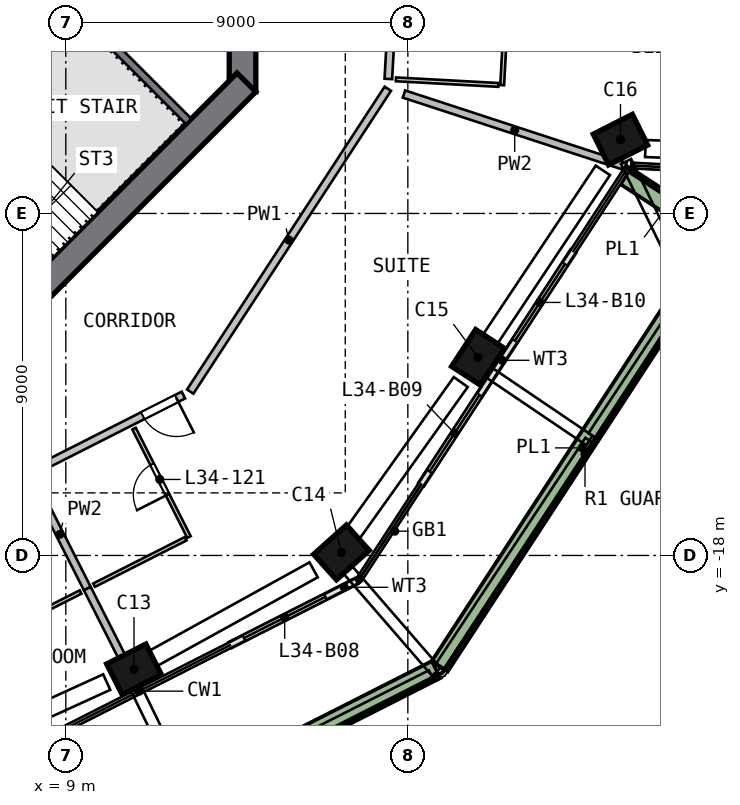
"""IFC4 building model, lengths in metres.
Left out: names, types, materials, properties, quantities, classifications, styles, units other than length and angle.
Written with IfcOpenShell. Run it as: python <this file> out.ifc"""

import sys

from ifc_helpers import new_model, si_unit, direction, frame, frame_2d, origin, origin_2d, place, context, subcontext, project, spatial, rectangle, extrude, element, fill, save


model = new_model("IFC4")
c1 = context("Model", 3, precision=1e-05, world=origin(), true_north=direction((0.0, 1.0)))
c2 = subcontext(c1, "Body", "Model", "MODEL_VIEW")
j1 = project(units=[si_unit("LENGTHUNIT", "METRE"), si_unit("PLANEANGLEUNIT", "RADIAN")], contexts=[c1])
p1 = place(None, origin())
s1 = spatial("IfcSite", under=j1, at=p1, CompositionType="ELEMENT")
p2 = place(p1, origin())
s2 = spatial("IfcBuilding", under=s1, at=p2, CompositionType="ELEMENT")
p3 = place(p2, frame((0.0, 0.0, 143.5)))
s3 = spatial("IfcBuildingStorey", under=s2, at=p3, CompositionType="ELEMENT", Elevation=143.5)
p4 = place(p3, frame((10.674, -21.058, 0.0), z_axis=(0.099777564, 0.051637931, 0.99366894), x_axis=(0.88633415, 0.449211123, -0.112343851)))
e1 = element("IfcColumn", 1, at=p4, inside=s3, PredefinedType="COLUMN", context=c2, shape_type="SweptSolid", body=[
    extrude(rectangle(XDim=1.15, YDim=0.9, at=origin_2d()), origin(), (0.0, 0.0, 1.0), 3.21),
])
p5 = place(p3, frame((16.15, -18.012, 0.0), z_axis=(0.084997843, 0.077471201, 0.993364777), x_axis=(-0.739822895, -0.662900147, 0.115002085)))
e2 = element("IfcColumn", 2, at=p5, inside=s3, PredefinedType="COLUMN", context=c2, shape_type="SweptSolid", body=[
    extrude(rectangle(XDim=1.15, YDim=0.9, at=origin_2d()), origin(), (0.0, 0.0, 1.0), 3.211),
])
p6 = place(p3, frame((19.773, -12.899, 0.0), z_axis=(0.060536429, 0.094531133, 0.993679629), x_axis=(0.54295729, 0.832224418, -0.112249269)))
e3 = element("IfcColumn", 3, at=p6, inside=s3, PredefinedType="COLUMN", context=c2, shape_type="SweptSolid", body=[
    extrude(rectangle(XDim=1.15, YDim=0.9, at=origin_2d()), origin(), (0.0, 0.0, 1.0), 3.21),
])
p7 = place(p3, frame((23.555, -7.193, 0.0), z_axis=(0.033215582, 0.112264107, 0.993123102), x_axis=(-0.892028419, -0.444821817, 0.080117729)))
e4 = element("IfcColumn", 4, at=p7, inside=s3, PredefinedType="COLUMN", context=c2, shape_type="SweptSolid", body=[
    extrude(rectangle(XDim=1.15, YDim=0.9, at=origin_2d()), origin(), (0.0, 0.0, 1.0), 3.212),
])
p8 = place(p3, frame((13.65, -5.799, 0.0), z_axis=(0.0, 0.0, 1.0), x_axis=(0.0, 1.0, 0.0)))
e5 = element("IfcWall", 5, at=p8, inside=s3, PredefinedType="SHEAR", context=c2, shape_type="SweptSolid", body=[
    extrude(rectangle(XDim=11.598, YDim=0.7, at=frame_2d((5.799, 0.0))), origin(), (0.0, 0.0, 1.0), 3.5),
])
p9 = place(p8, frame((4.899, 0.0, 0.0)))
e6 = element("IfcOpeningElement", 6, at=p9, cuts=e5, PredefinedType="OPENING", context=c2, shape_type="SweptSolid", body=[
    extrude(rectangle(XDim=1.8, YDim=2.1, at=frame_2d((0.9, 1.05))), frame((0.0, 0.36, 0.0), z_axis=(0.0, -1.0, 0.0), x_axis=(1.0, 0.0, 0.0)), (0.0, 0.0, 1.0), 0.72),
])
p10 = place(p3, frame((5.552, -13.752, 0.0), z_axis=(0.0, 0.0, 1.0), x_axis=(0.707106781, 0.707106781, 0.0)))
e7 = element("IfcWall", 7, at=p10, inside=s3, PredefinedType="SHEAR", context=c2, shape_type="SweptSolid", body=[
    extrude(rectangle(XDim=11.598, YDim=0.7, at=frame_2d((5.799, 0.0))), origin(), (0.0, 0.0, 1.0), 3.5),
])
p11 = place(p10, frame((2.099, 0.0, 0.0)))
e8 = element("IfcOpeningElement", 8, at=p11, cuts=e7, PredefinedType="OPENING", context=c2, shape_type="SweptSolid", body=[
    extrude(rectangle(XDim=1.2, YDim=2.1, at=frame_2d((0.6, 1.05))), frame((0.0, 0.36, 0.0), z_axis=(0.0, -1.0, 0.0), x_axis=(1.0, 0.0, 0.0)), (0.0, 0.0, 1.0), 0.72),
])
p12 = place(p3, frame((13.333, -20.354, 0.0), z_axis=(0.0, 0.0, 1.0), x_axis=(0.891939183, 0.452155388, 0.0)))
e9 = element("IfcWall", 9, at=p12, inside=s3, PredefinedType="SOLIDWALL", context=c2, shape_type="SweptSolid", body=[
    extrude(rectangle(XDim=3.71, YDim=0.15, at=frame_2d((1.855, 0.0))), origin(), (0.0, 0.0, 1.0), 2.475),
])
p13 = place(p12, frame((0.4, 0.0, 0.0)))
e10 = element("IfcOpeningElement", 10, at=p13, cuts=e9, PredefinedType="OPENING", context=c2, shape_type="SweptSolid", body=[
    extrude(rectangle(XDim=2.4, YDim=2.4, at=frame_2d((1.2, 1.2))), frame((0.0, 0.085, 0.0), z_axis=(0.0, -1.0, 0.0), x_axis=(1.0, 0.0, 0.0)), (0.0, 0.0, 1.0), 0.17),
])
p14 = place(p3, frame((18.355, -16.124, 0.0), z_axis=(0.0, 0.0, 1.0), x_axis=(0.546387789, 0.837532318, 0.0)))
e11 = element("IfcWall", 11, at=p14, inside=s3, PredefinedType="SOLIDWALL", context=c2, shape_type="SweptSolid", body=[
    extrude(rectangle(XDim=3.475, YDim=0.15, at=frame_2d((1.737, 0.0))), origin(), (0.0, 0.0, 1.0), 2.475),
])
p15 = place(p14, frame((0.4, 0.0, 0.0)))
e12 = element("IfcOpeningElement", 12, at=p15, cuts=e11, PredefinedType="OPENING", context=c2, shape_type="SweptSolid", body=[
    extrude(rectangle(XDim=2.4, YDim=2.4, at=frame_2d((1.2, 1.2))), frame((0.0, 0.085, 0.0), z_axis=(0.0, -1.0, 0.0), x_axis=(1.0, 0.0, 0.0)), (0.0, 0.0, 1.0), 0.17),
])
p16 = place(p3, frame((20.254, -13.214, 0.0), z_axis=(0.0, 0.0, 1.0), x_axis=(0.546388156, 0.837532079, 0.0)))
e13 = element("IfcWall", 13, at=p16, inside=s3, PredefinedType="SOLIDWALL", context=c2, shape_type="SweptSolid", body=[
    extrude(rectangle(XDim=3.835, YDim=0.15, at=frame_2d((1.918, 0.0))), origin(), (0.0, 0.0, 1.0), 2.475),
])
p17 = place(p16, frame((1.035, 0.0, 0.0)))
e14 = element("IfcOpeningElement", 14, at=p17, cuts=e13, PredefinedType="OPENING", context=c2, shape_type="SweptSolid", body=[
    extrude(rectangle(XDim=2.4, YDim=2.4, at=frame_2d((1.2, 1.2))), frame((0.0, 0.085, 0.0), z_axis=(0.0, -1.0, 0.0), x_axis=(1.0, 0.0, 0.0)), (0.0, 0.0, 1.0), 0.17),
])
p18 = place(p3, frame((6.95, -26.981, 0.0), z_axis=(0.0, 0.0, 1.0), x_axis=(0.891954479, 0.452125212, 0.0)))
e15 = element("IfcWall", 15, at=p18, inside=s3, PredefinedType="SOLIDWALL", context=c2, shape_type="SweptSolid", body=[
    extrude(rectangle(XDim=13.224, YDim=0.5, at=frame_2d((6.612, 0.0))), origin(), (0.0, 0.0, 1.0), 0.7),
])
p19 = place(p3, frame((18.841, -20.916, 0.0), z_axis=(0.0, 0.0, 1.0), x_axis=(0.546404526, 0.837521399, 0.0)))
e16 = element("IfcWall", 16, at=p19, inside=s3, PredefinedType="SOLIDWALL", context=c2, shape_type="SweptSolid", body=[
    extrude(rectangle(XDim=13.723, YDim=0.5, at=frame_2d((6.862, 0.0))), origin(), (0.0, 0.0, 1.0), 0.7),
])
p20 = place(p3, frame((25.993, -9.495, 0.0), z_axis=(0.0, 0.0, 1.0), x_axis=(-0.837506212, 0.546427803, 0.0)))
e17 = element("IfcWall", 17, at=p20, inside=s3, PredefinedType="SOLIDWALL", context=c2, shape_type="SweptSolid", body=[
    extrude(rectangle(XDim=2.699, YDim=0.5, at=frame_2d((1.35, 0.0))), origin(), (0.0, 0.0, 1.0), 0.7),
])
p21 = place(p3, frame((9.334, -3.535, 0.0), z_axis=(0.0, 0.0, 1.0), x_axis=(-0.707106781, -0.707106781, 0.0)))
e18 = element("IfcWall", 18, at=p21, inside=s3, PredefinedType="SOLIDWALL", context=c2, shape_type="SweptSolid", body=[
    extrude(rectangle(XDim=8.2, YDim=0.2, at=frame_2d((4.1, 0.0))), origin(), (0.0, 0.0, 1.0), 3.19),
])
p22 = place(p21, frame((6.6, 0.0, 0.0)))
e19 = element("IfcOpeningElement", 19, at=p22, cuts=e18, PredefinedType="OPENING", context=c2, shape_type="SweptSolid", body=[
    extrude(rectangle(XDim=1.2, YDim=2.1, at=frame_2d((0.6, 1.05))), frame((0.0, 0.11, 0.0), z_axis=(0.0, -1.0, 0.0), x_axis=(1.0, 0.0, 0.0)), (0.0, 0.0, 1.0), 0.22),
])
p23 = place(p3, frame((9.334, -3.677, 0.0), z_axis=(0.0, 0.0, 1.0), x_axis=(0.707106781, -0.707106781, 0.0)))
e20 = element("IfcWall", 20, at=p23, inside=s3, PredefinedType="SOLIDWALL", context=c2, shape_type="SweptSolid", body=[
    extrude(rectangle(XDim=4.1, YDim=0.2, at=frame_2d((2.05, 0.0))), origin(), (0.0, 0.0, 1.0), 3.19),
])
p24 = place(p3, frame((12.094, -13.779, 0.0), z_axis=(0.0, 0.0, 1.0), x_axis=(-0.891955141, -0.452123906, 0.0)))
e21 = element("IfcWall", 21, at=p24, inside=s3, PredefinedType="SOLIDWALL", context=c2, shape_type="SweptSolid", body=[
    extrude(rectangle(XDim=9.116, YDim=0.2, at=frame_2d((4.558, 0.0))), origin(), (0.0, 0.0, 1.0), 3.19),
])
p25 = place(p24, frame((0.2, 0.0, 0.0)))
e22 = element("IfcOpeningElement", 22, at=p25, cuts=e21, PredefinedType="OPENING", context=c2, shape_type="SweptSolid", body=[
    extrude(rectangle(XDim=1.0, YDim=2.1, at=frame_2d((0.5, 1.05))), frame((0.0, 0.11, 0.0), z_axis=(0.0, -1.0, 0.0), x_axis=(1.0, 0.0, 0.0)), (0.0, 0.0, 1.0), 0.22),
])
p26 = place(p3, frame((12.273, -13.688, 0.0), z_axis=(0.0, 0.0, 1.0), x_axis=(0.546401601, 0.837523307, 0.0)))
e23 = element("IfcWall", 23, at=p26, inside=s3, PredefinedType="SOLIDWALL", context=c2, shape_type="SweptSolid", body=[
    extrude(rectangle(XDim=9.516, YDim=0.2, at=frame_2d((4.758, 0.0))), origin(), (0.0, 0.0, 1.0), 3.19),
])
p27 = place(p3, frame((17.487, -5.46, 0.0), z_axis=(0.0, 0.0, 1.0), x_axis=(0.054428046, 0.998517695, 0.0)))
e24 = element("IfcWall", 24, at=p27, inside=s3, PredefinedType="SOLIDWALL", context=c2, shape_type="SweptSolid", body=[
    extrude(rectangle(XDim=3.4, YDim=0.2, at=frame_2d((1.7, 0.0))), origin(), (0.0, 0.0, 1.0), 3.19),
])
p28 = place(p3, frame((8.119, -16.018, 0.0), z_axis=(0.0, 0.0, 1.0), x_axis=(0.452120203, -0.891957018, 0.0)))
e25 = element("IfcWall", 25, at=p28, inside=s3, PredefinedType="SOLIDWALL", context=c2, shape_type="SweptSolid", body=[
    extrude(rectangle(XDim=3.2, YDim=0.2, at=frame_2d((1.6, 0.0))), origin(), (0.0, 0.0, 1.0), 3.19),
])
p29 = place(p3, frame((9.566, -18.872, 0.0), z_axis=(0.0, 0.0, 1.0), x_axis=(0.452106151, -0.89196414, 0.0)))
e26 = element("IfcWall", 26, at=p29, inside=s3, PredefinedType="SOLIDWALL", context=c2, shape_type="SweptSolid", body=[
    extrude(rectangle(XDim=2.95, YDim=0.2, at=frame_2d((1.475, 0.0))), origin(), (0.0, 0.0, 1.0), 3.19),
])
p30 = place(p3, frame((17.898, -5.857, 0.0), z_axis=(0.0, 0.0, 1.0), x_axis=(0.950412749, -0.310991328, 0.0)))
e27 = element("IfcWall", 27, at=p30, inside=s3, PredefinedType="SOLIDWALL", context=c2, shape_type="SweptSolid", body=[
    extrude(rectangle(XDim=6.132, YDim=0.2, at=frame_2d((3.066, 0.0))), origin(), (0.0, 0.0, 1.0), 3.19),
])
for number, where, z_axis, x_axis in (
    (28, (6.979, -20.183, 0.0), (0.0, 0.0, 1.0), (0.892, 0.452, 0.0)),
    (29, (12.153, -17.561, 0.0), (0.0, 0.0, 1.0), (-0.892, -0.452, 0.0)),
):
    element("IfcWall", number, at=place(p3, frame(where, z_axis=z_axis, x_axis=x_axis)), inside=s3, PredefinedType="PARTITIONING", context=c2, shape_type="SweptSolid", body=[
        extrude(rectangle(XDim=2.7, YDim=0.1, at=frame_2d((1.35, 0.0))), origin(), (0.0, 0.0, 1.0), 3.19),
    ])
p31 = place(p3, frame((12.242, -17.516, 0.0), z_axis=(0.0, 0.0, 1.0), x_axis=(-0.452120203, 0.891957018, 0.0)))
e30 = element("IfcWall", 30, at=p31, inside=s3, PredefinedType="PARTITIONING", context=c2, shape_type="SweptSolid", body=[
    extrude(rectangle(XDim=3.2, YDim=0.1, at=frame_2d((1.6, 0.0))), origin(), (0.0, 0.0, 1.0), 3.19),
])
p32 = place(p31, frame((1.25, 0.0, 0.0)))
e31 = element("IfcOpeningElement", 31, at=p32, cuts=e30, PredefinedType="OPENING", context=c2, shape_type="SweptSolid", body=[
    extrude(rectangle(XDim=0.9, YDim=2.1, at=frame_2d((0.45, 1.05))), frame((0.0, 0.06, 0.0), z_axis=(0.0, -1.0, 0.0), x_axis=(1.0, 0.0, 0.0)), (0.0, 0.0, 1.0), 0.12),
])
p33 = place(p3, frame((17.687, -5.471, 0.0), z_axis=(0.0, 0.0, 1.0), x_axis=(0.998517406, -0.054433349, 0.0)))
e32 = element("IfcWall", 32, at=p33, inside=s3, PredefinedType="PARTITIONING", context=c2, shape_type="SweptSolid", body=[
    extrude(rectangle(XDim=2.7, YDim=0.1, at=frame_2d((1.35, 0.0))), origin(), (0.0, 0.0, 1.0), 3.19),
])
p34 = place(p3, frame((20.483, -5.623, 0.0), z_axis=(0.0, 0.0, 1.0), x_axis=(0.054396725, 0.998519402, 0.0)))
e33 = element("IfcWall", 33, at=p34, inside=s3, PredefinedType="PARTITIONING", context=c2, shape_type="SweptSolid", body=[
    extrude(rectangle(XDim=3.2, YDim=0.1, at=frame_2d((1.6, 0.0))), origin(), (0.0, 0.0, 1.0), 3.19),
])
p35 = place(p34, frame((1.25, 0.0, 0.0)))
e34 = element("IfcOpeningElement", 34, at=p35, cuts=e33, PredefinedType="OPENING", context=c2, shape_type="SweptSolid", body=[
    extrude(rectangle(XDim=0.9, YDim=2.1, at=frame_2d((0.45, 1.05))), frame((0.0, 0.06, 0.0), z_axis=(0.0, -1.0, 0.0), x_axis=(1.0, 0.0, 0.0)), (0.0, 0.0, 1.0), 0.12),
])
p36 = place(p13, origin())
e35 = element("IfcDoor", 35, at=p36, inside=s3, OperationType="SLIDING_TO_RIGHT", PredefinedType="DOOR", context=c2, shape_type="SweptSolid", body=[
    extrude(rectangle(XDim=2.4, YDim=2.4, at=frame_2d((1.2, 1.2))), frame((0.0, 0.025, 0.0), z_axis=(0.0, -1.0, 0.0), x_axis=(1.0, 0.0, 0.0)), (0.0, 0.0, 1.0), 0.05),
])
fill(e10, e35)
p37 = place(p15, origin())
e36 = element("IfcDoor", 36, at=p37, inside=s3, OperationType="SLIDING_TO_RIGHT", PredefinedType="DOOR", context=c2, shape_type="SweptSolid", body=[
    extrude(rectangle(XDim=2.4, YDim=2.4, at=frame_2d((1.2, 1.2))), frame((0.0, 0.025, 0.0), z_axis=(0.0, -1.0, 0.0), x_axis=(1.0, 0.0, 0.0)), (0.0, 0.0, 1.0), 0.05),
])
fill(e12, e36)
p38 = place(p17, origin())
e37 = element("IfcDoor", 37, at=p38, inside=s3, OperationType="SLIDING_TO_LEFT", PredefinedType="DOOR", context=c2, shape_type="SweptSolid", body=[
    extrude(rectangle(XDim=2.4, YDim=2.4, at=frame_2d((1.2, 1.2))), frame((0.0, 0.025, 0.0), z_axis=(0.0, -1.0, 0.0), x_axis=(1.0, 0.0, 0.0)), (0.0, 0.0, 1.0), 0.05),
])
fill(e14, e37)
p39 = place(p25, origin())
e38 = element("IfcDoor", 38, at=p39, inside=s3, OperationType="SINGLE_SWING_LEFT", PredefinedType="DOOR", context=c2, shape_type="SweptSolid", body=[
    extrude(rectangle(XDim=1.0, YDim=2.1, at=frame_2d((0.5, 1.05))), frame((0.0, 0.025, 0.0), z_axis=(0.0, -1.0, 0.0), x_axis=(1.0, 0.0, 0.0)), (0.0, 0.0, 1.0), 0.05),
])
fill(e22, e38)
p40 = place(p32, origin())
e39 = element("IfcDoor", 39, at=p40, inside=s3, OperationType="SINGLE_SWING_LEFT", PredefinedType="DOOR", context=c2, shape_type="SweptSolid", body=[
    extrude(rectangle(XDim=0.9, YDim=2.1, at=frame_2d((0.45, 1.05))), frame((0.0, 0.025, 0.0), z_axis=(0.0, -1.0, 0.0), x_axis=(1.0, 0.0, 0.0)), (0.0, 0.0, 1.0), 0.05),
])
fill(e31, e39)
save(model, sys.argv[1])
